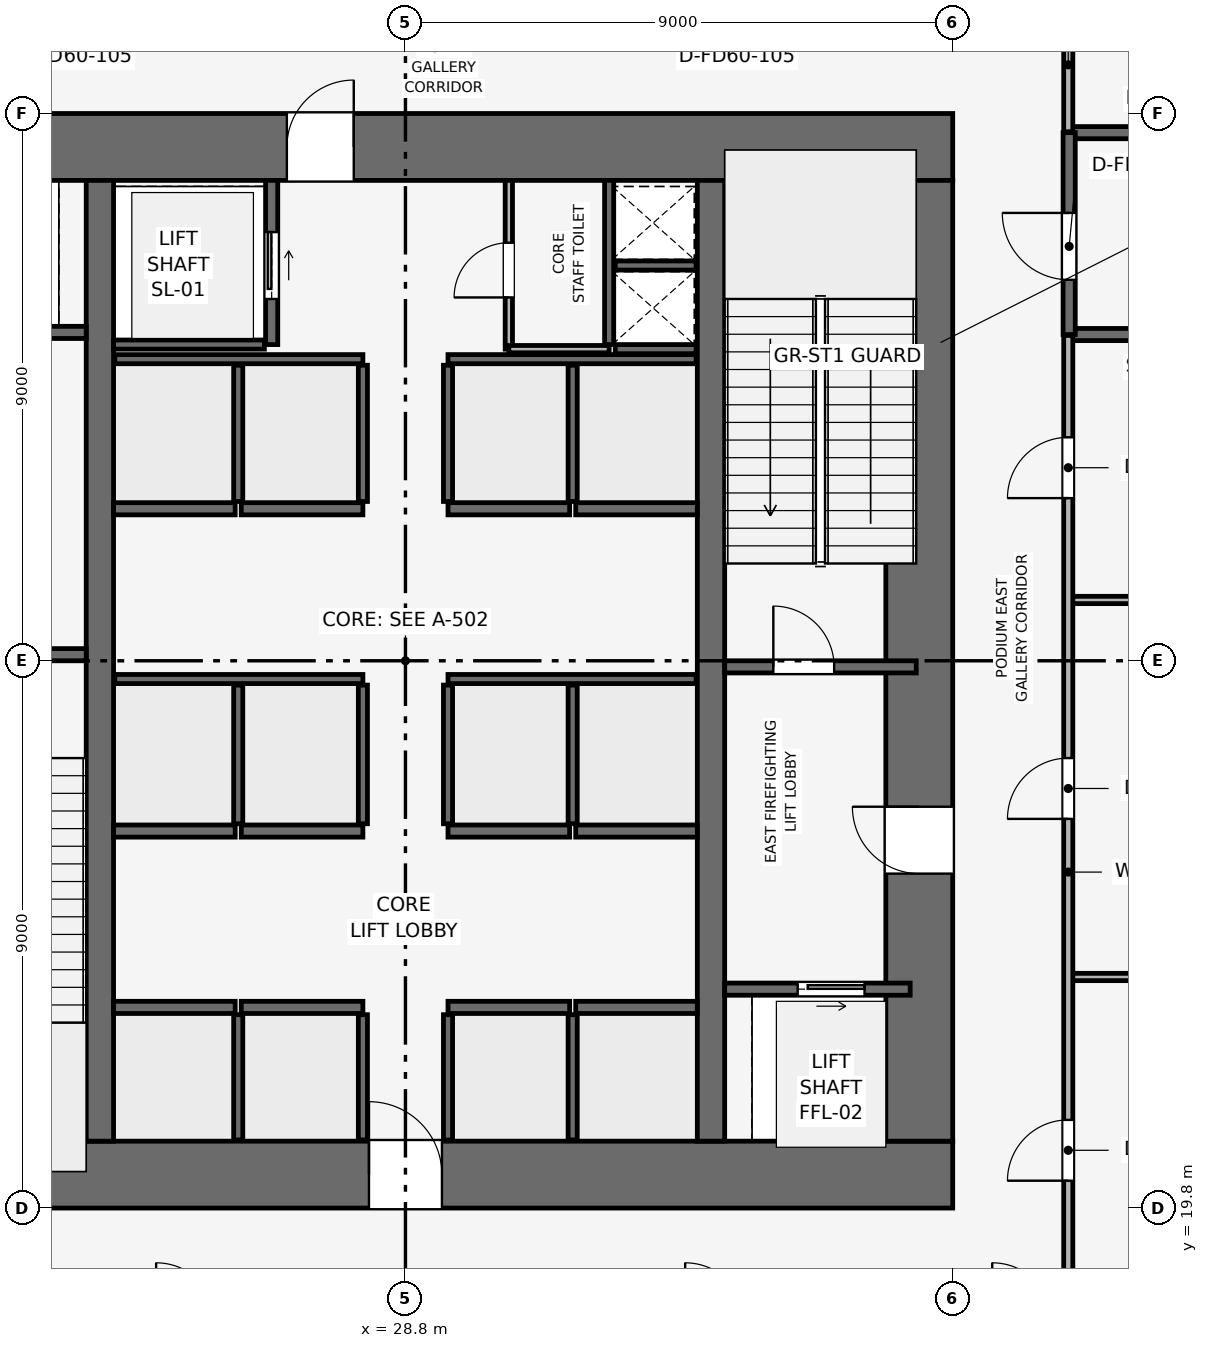
"""IFC4 building model, lengths in metres.
Left out: names, types, materials, properties, quantities, classifications, styles, units other than length and angle.
Written with IfcOpenShell. Run it as: python <this file> out.ifc"""

import sys

from ifc_helpers import new_model, si_unit, direction, frame, frame_2d, origin, place, context, subcontext, project, spatial, rectangle, extrude, element, fill, save


model = new_model("IFC4")
c1 = context("Model", 3, precision=1e-05, world=origin(), true_north=direction((0.0, 1.0)))
c2 = subcontext(c1, "Body", "Model", "MODEL_VIEW")
j1 = project(units=[si_unit("LENGTHUNIT", "METRE"), si_unit("PLANEANGLEUNIT", "RADIAN")], contexts=[c1])
p1 = place(None, origin())
s1 = spatial("IfcSite", under=j1, at=p1, CompositionType="ELEMENT")
p2 = place(p1, origin())
s2 = spatial("IfcBuilding", under=s1, at=p2, CompositionType="ELEMENT")
p3 = place(p2, frame((0.0, 0.0, 13.8)))
s3 = spatial("IfcBuildingStorey", under=s2, at=p3, CompositionType="ELEMENT", Elevation=13.8)
p4 = place(p3, frame((19.8, 20.35, 0.0), z_axis=(0.0, 0.0, 1.0), x_axis=(1.0, 0.0, 0.0)))
e1 = element("IfcWall", 1, at=p4, inside=s3, PredefinedType="SHEAR", context=c2, shape_type="SweptSolid", body=[
    extrude(rectangle(XDim=18.0, YDim=1.1, at=frame_2d((9.0, 0.0))), origin(), (0.0, 0.0, 1.0), 5.4),
])
p5 = place(p4, frame((8.4, 0.0, 0.0)))
e2 = element("IfcOpeningElement", 2, at=p5, cuts=e1, PredefinedType="OPENING", context=c2, shape_type="SweptSolid", body=[
    extrude(rectangle(XDim=1.2, YDim=2.2, at=frame_2d((0.6, 1.1))), frame((0.0, 0.56, 0.0), z_axis=(0.0, -1.0, 0.0), x_axis=(1.0, 0.0, 0.0)), (0.0, 0.0, 1.0), 1.12),
])
p6 = place(p3, frame((19.8, 37.25, 0.0), z_axis=(0.0, 0.0, 1.0), x_axis=(1.0, 0.0, 0.0)))
e3 = element("IfcWall", 3, at=p6, inside=s3, PredefinedType="SHEAR", context=c2, shape_type="SweptSolid", body=[
    extrude(rectangle(XDim=18.0, YDim=1.1, at=frame_2d((9.0, 0.0))), origin(), (0.0, 0.0, 1.0), 5.4),
])
p7 = place(p6, frame((7.05, 0.0, 0.0)))
e4 = element("IfcOpeningElement", 4, at=p7, cuts=e3, PredefinedType="OPENING", context=c2, shape_type="SweptSolid", body=[
    extrude(rectangle(XDim=1.1, YDim=2.15, at=frame_2d((0.55, 1.075))), frame((0.0, 0.56, 0.0), z_axis=(0.0, -1.0, 0.0), x_axis=(1.0, 0.0, 0.0)), (0.0, 0.0, 1.0), 1.12),
])
p8 = place(p3, frame((37.25, 20.9, 0.0), z_axis=(0.0, 0.0, 1.0), x_axis=(0.0, 1.0, 0.0)))
e5 = element("IfcWall", 5, at=p8, inside=s3, PredefinedType="SHEAR", context=c2, shape_type="SweptSolid", body=[
    extrude(rectangle(XDim=15.8, YDim=1.1, at=frame_2d((7.9, 0.0))), origin(), (0.0, 0.0, 1.0), 5.4),
])
p9 = place(p8, frame((4.4, 0.0, 0.0)))
e6 = element("IfcOpeningElement", 6, at=p9, cuts=e5, PredefinedType="OPENING", context=c2, shape_type="SweptSolid", body=[
    extrude(rectangle(XDim=1.1, YDim=2.15, at=frame_2d((0.55, 1.075))), frame((0.0, 0.56, 0.0), z_axis=(0.0, -1.0, 0.0), x_axis=(1.0, 0.0, 0.0)), (0.0, 0.0, 1.0), 1.12),
])
for number, where, z_axis, x_axis in (
    (7, (23.775, 20.9, 0.0), (0.0, 0.0, 1.0), (0.0, 1.0, 0.0)),
    (8, (33.825, 20.9, 0.0), (0.0, 0.0, 1.0), (0.0, 1.0, 0.0)),
):
    element("IfcWall", number, at=place(p3, frame(where, z_axis=z_axis, x_axis=x_axis)), inside=s3, PredefinedType="SHEAR", context=c2, shape_type="SweptSolid", body=[
        extrude(rectangle(XDim=15.8, YDim=0.45, at=frame_2d((7.9, 0.0))), origin(), (0.0, 0.0, 1.0), 5.4),
    ])
p10 = place(p3, frame((20.4, 28.9, 0.0), z_axis=(0.0, 0.0, 1.0), x_axis=(1.0, 0.0, 0.0)))
e9 = element("IfcWall", 9, at=p10, inside=s3, PredefinedType="SHEAR", context=c2, shape_type="SweptSolid", body=[
    extrude(rectangle(XDim=3.15, YDim=0.2, at=frame_2d((1.575, 0.0))), origin(), (0.0, 0.0, 1.0), 5.05),
])
p11 = place(p10, frame((0.8, 0.0, 0.0)))
e10 = element("IfcOpeningElement", 10, at=p11, cuts=e9, PredefinedType="OPENING", context=c2, shape_type="SweptSolid", body=[
    extrude(rectangle(XDim=1.0, YDim=2.1, at=frame_2d((0.5, 1.05))), frame((0.0, 0.11, 0.0), z_axis=(0.0, -1.0, 0.0), x_axis=(1.0, 0.0, 0.0)), (0.0, 0.0, 1.0), 0.22),
])
p12 = place(p3, frame((34.05, 28.7, 0.0), z_axis=(0.0, 0.0, 1.0), x_axis=(1.0, 0.0, 0.0)))
e11 = element("IfcWall", 11, at=p12, inside=s3, PredefinedType="SHEAR", context=c2, shape_type="SweptSolid", body=[
    extrude(rectangle(XDim=3.15, YDim=0.2, at=frame_2d((1.575, 0.0))), origin(), (0.0, 0.0, 1.0), 5.05),
])
p13 = place(p12, frame((0.8, 0.0, 0.0)))
e12 = element("IfcOpeningElement", 12, at=p13, cuts=e11, PredefinedType="OPENING", context=c2, shape_type="SweptSolid", body=[
    extrude(rectangle(XDim=1.0, YDim=2.1, at=frame_2d((0.5, 1.05))), frame((0.0, 0.11, 0.0), z_axis=(0.0, -1.0, 0.0), x_axis=(1.0, 0.0, 0.0)), (0.0, 0.0, 1.0), 0.22),
])
p14 = place(p3, frame((32.15, 34.0, 0.0), z_axis=(0.0, 0.0, 1.0), x_axis=(0.0, 1.0, 0.0)))
e13 = element("IfcWall", 13, at=p14, inside=s3, PredefinedType="SHEAR", context=c2, shape_type="SweptSolid", body=[
    extrude(rectangle(XDim=2.7, YDim=0.15, at=frame_2d((1.35, 0.0))), origin(), (0.0, 0.0, 1.0), 5.05),
])
for number, where, z_axis, x_axis in (
    (14, (32.25, 33.925, 0.0), (0.0, 0.0, 1.0), (1.0, 0.0, 0.0)),
    (15, (32.25, 35.3, 0.0), (0.0, 0.0, 1.0), (1.0, 0.0, 0.0)),
):
    element("IfcWall", number, at=place(p3, frame(where, z_axis=z_axis, x_axis=x_axis)), inside=s3, PredefinedType="SHEAR", context=c2, shape_type="SweptSolid", body=[
        extrude(rectangle(XDim=1.33, YDim=0.15, at=frame_2d((0.665, 0.0))), origin(), (0.0, 0.0, 1.0), 5.05),
    ])
p15 = place(p3, frame((20.5, 34.2, 0.0), z_axis=(0.0, 0.0, 1.0), x_axis=(1.0, 0.0, 0.0)))
e16 = element("IfcWall", 16, at=p15, inside=s3, PredefinedType="SHEAR", context=c2, shape_type="SweptSolid", body=[
    extrude(rectangle(XDim=3.05, YDim=0.2, at=frame_2d((1.525, 0.0))), origin(), (0.0, 0.0, 1.0), 5.05),
])
p16 = place(p15, frame((0.75, 0.0, 0.0)))
e17 = element("IfcOpeningElement", 17, at=p16, cuts=e16, PredefinedType="OPENING", context=c2, shape_type="SweptSolid", body=[
    extrude(rectangle(XDim=1.1, YDim=2.15, at=frame_2d((0.55, 1.075))), frame((0.0, 0.11, 0.0), z_axis=(0.0, -1.0, 0.0), x_axis=(1.0, 0.0, 0.0)), (0.0, 0.0, 1.0), 0.22),
])
p17 = place(p3, frame((34.05, 23.4, 0.0), z_axis=(0.0, 0.0, 1.0), x_axis=(1.0, 0.0, 0.0)))
e18 = element("IfcWall", 18, at=p17, inside=s3, PredefinedType="SHEAR", context=c2, shape_type="SweptSolid", body=[
    extrude(rectangle(XDim=3.05, YDim=0.2, at=frame_2d((1.525, 0.0))), origin(), (0.0, 0.0, 1.0), 5.05),
])
p18 = place(p17, frame((1.2, 0.0, 0.0)))
e19 = element("IfcOpeningElement", 19, at=p18, cuts=e18, PredefinedType="OPENING", context=c2, shape_type="SweptSolid", body=[
    extrude(rectangle(XDim=1.1, YDim=2.15, at=frame_2d((0.55, 1.075))), frame((0.0, 0.11, 0.0), z_axis=(0.0, -1.0, 0.0), x_axis=(1.0, 0.0, 0.0)), (0.0, 0.0, 1.0), 0.22),
])
p19 = place(p3, frame((26.6, 34.0, 0.0), z_axis=(0.0, 0.0, 1.0), x_axis=(0.0, 1.0, 0.0)))
e20 = element("IfcWall", 20, at=p19, inside=s3, PredefinedType="SHEAR", context=c2, shape_type="SweptSolid", body=[
    extrude(rectangle(XDim=2.7, YDim=0.2, at=frame_2d((1.35, 0.0))), origin(), (0.0, 0.0, 1.0), 5.05),
])
p20 = place(p19, frame((0.75, 0.0, 0.0)))
e21 = element("IfcOpeningElement", 21, at=p20, cuts=e20, PredefinedType="OPENING", context=c2, shape_type="SweptSolid", body=[
    extrude(rectangle(XDim=1.1, YDim=2.15, at=frame_2d((0.55, 1.075))), frame((0.0, 0.11, 0.0), z_axis=(0.0, -1.0, 0.0), x_axis=(1.0, 0.0, 0.0)), (0.0, 0.0, 1.0), 0.22),
])
p21 = place(p3, frame((24.0, 34.0, 0.0), z_axis=(0.0, 0.0, 1.0), x_axis=(1.0, 0.0, 0.0)))
e22 = element("IfcWall", 22, at=p21, inside=s3, PredefinedType="SHEAR", context=c2, shape_type="SweptSolid", body=[
    extrude(rectangle(XDim=2.48, YDim=0.15, at=frame_2d((1.24, 0.0))), origin(), (0.0, 0.0, 1.0), 5.05),
])
for number, where, z_axis, x_axis in (
    (23, (24.0, 23.1, 0.0), (0.0, 0.0, 1.0), (1.0, 0.0, 0.0)),
    (24, (26.1, 23.1, 0.0), (0.0, 0.0, 1.0), (1.0, 0.0, 0.0)),
    (25, (29.5, 23.1, 0.0), (0.0, 0.0, 1.0), (1.0, 0.0, 0.0)),
    (26, (31.6, 23.1, 0.0), (0.0, 0.0, 1.0), (1.0, 0.0, 0.0)),
    (27, (24.0, 26.0, 0.0), (0.0, 0.0, 1.0), (1.0, 0.0, 0.0)),
    (28, (26.1, 26.0, 0.0), (0.0, 0.0, 1.0), (1.0, 0.0, 0.0)),
    (29, (29.5, 26.0, 0.0), (0.0, 0.0, 1.0), (1.0, 0.0, 0.0)),
    (30, (31.6, 26.0, 0.0), (0.0, 0.0, 1.0), (1.0, 0.0, 0.0)),
    (31, (24.0, 31.3, 0.0), (0.0, 0.0, 1.0), (1.0, 0.0, 0.0)),
    (32, (26.1, 31.3, 0.0), (0.0, 0.0, 1.0), (1.0, 0.0, 0.0)),
    (33, (29.5, 31.3, 0.0), (0.0, 0.0, 1.0), (1.0, 0.0, 0.0)),
    (34, (31.6, 31.3, 0.0), (0.0, 0.0, 1.0), (1.0, 0.0, 0.0)),
):
    element("IfcWall", number, at=place(p3, frame(where, z_axis=z_axis, x_axis=x_axis)), inside=s3, PredefinedType="SHEAR", context=c2, shape_type="SweptSolid", body=[
        extrude(rectangle(XDim=2.0, YDim=0.2, at=frame_2d((1.0, 0.0))), origin(), (0.0, 0.0, 1.0), 5.05),
    ])
for number, where, z_axis, x_axis in (
    (35, (26.05, 20.92, 0.0), (0.0, 0.0, 1.0), (0.0, 1.0, 0.0)),
    (36, (28.1, 20.92, 0.0), (0.0, 0.0, 1.0), (0.0, 1.0, 0.0)),
    (37, (29.5, 20.92, 0.0), (0.0, 0.0, 1.0), (0.0, 1.0, 0.0)),
    (38, (31.55, 20.92, 0.0), (0.0, 0.0, 1.0), (0.0, 1.0, 0.0)),
):
    element("IfcWall", number, at=place(p3, frame(where, z_axis=z_axis, x_axis=x_axis)), inside=s3, PredefinedType="SHEAR", context=c2, shape_type="SweptSolid", body=[
        extrude(rectangle(XDim=2.06, YDim=0.15, at=frame_2d((1.03, 0.0))), origin(), (0.0, 0.0, 1.0), 5.05),
    ])
for number, where, z_axis, x_axis in (
    (39, (24.02, 28.5, 0.0), (0.0, 0.0, 1.0), (1.0, 0.0, 0.0)),
    (40, (29.5, 28.5, 0.0), (0.0, 0.0, 1.0), (1.0, 0.0, 0.0)),
):
    element("IfcWall", number, at=place(p3, frame(where, z_axis=z_axis, x_axis=x_axis)), inside=s3, PredefinedType="SHEAR", context=c2, shape_type="SweptSolid", body=[
        extrude(rectangle(XDim=4.08, YDim=0.15, at=frame_2d((2.04, 0.0))), origin(), (0.0, 0.0, 1.0), 5.05),
    ])
for number, where, z_axis, x_axis in (
    (41, (26.05, 26.12, 0.0), (0.0, 0.0, 1.0), (0.0, 1.0, 0.0)),
    (42, (28.1, 26.12, 0.0), (0.0, 0.0, 1.0), (0.0, 1.0, 0.0)),
    (43, (29.5, 26.12, 0.0), (0.0, 0.0, 1.0), (0.0, 1.0, 0.0)),
    (44, (31.55, 26.12, 0.0), (0.0, 0.0, 1.0), (0.0, 1.0, 0.0)),
):
    element("IfcWall", number, at=place(p3, frame(where, z_axis=z_axis, x_axis=x_axis)), inside=s3, PredefinedType="SHEAR", context=c2, shape_type="SweptSolid", body=[
        extrude(rectangle(XDim=2.28, YDim=0.15, at=frame_2d((1.14, 0.0))), origin(), (0.0, 0.0, 1.0), 5.05),
    ])
for number, where, z_axis, x_axis in (
    (45, (24.02, 33.76, 0.0), (0.0, 0.0, 1.0), (1.0, 0.0, 0.0)),
    (46, (29.5, 33.76, 0.0), (0.0, 0.0, 1.0), (1.0, 0.0, 0.0)),
):
    element("IfcWall", number, at=place(p3, frame(where, z_axis=z_axis, x_axis=x_axis)), inside=s3, PredefinedType="SHEAR", context=c2, shape_type="SweptSolid", body=[
        extrude(rectangle(XDim=4.08, YDim=0.15, at=frame_2d((2.04, 0.0))), origin(), (0.0, 0.0, 1.0), 5.05),
    ])
for number, where, z_axis, x_axis in (
    (47, (26.05, 31.42, 0.0), (0.0, 0.0, 1.0), (0.0, 1.0, 0.0)),
    (48, (28.1, 31.42, 0.0), (0.0, 0.0, 1.0), (0.0, 1.0, 0.0)),
    (49, (29.5, 31.42, 0.0), (0.0, 0.0, 1.0), (0.0, 1.0, 0.0)),
    (50, (31.55, 31.42, 0.0), (0.0, 0.0, 1.0), (0.0, 1.0, 0.0)),
):
    element("IfcWall", number, at=place(p3, frame(where, z_axis=z_axis, x_axis=x_axis)), inside=s3, PredefinedType="SHEAR", context=c2, shape_type="SweptSolid", body=[
        extrude(rectangle(XDim=2.24, YDim=0.15, at=frame_2d((1.12, 0.0))), origin(), (0.0, 0.0, 1.0), 5.05),
    ])
for number, where, z_axis, x_axis in (
    (51, (39.715, 34.165, 0.0), (0.0, 0.0, 1.0), (1.0, 0.0, 0.0)),
    (52, (39.715, 37.485, 0.0), (0.0, 0.0, 1.0), (1.0, 0.0, 0.0)),
):
    element("IfcWall", number, at=place(p3, frame(where, z_axis=z_axis, x_axis=x_axis)), inside=s3, PredefinedType="SHEAR", context=c2, shape_type="SweptSolid", body=[
        extrude(rectangle(XDim=8.57, YDim=0.2, at=frame_2d((4.285, 0.0))), origin(), (0.0, 0.0, 1.0), 5.398),
    ])
p22 = place(p3, frame((39.715, 34.165, 0.0), z_axis=(0.0, 0.0, 1.0), x_axis=(0.0, 1.0, 0.0)))
e53 = element("IfcWall", 53, at=p22, inside=s3, PredefinedType="SHEAR", context=c2, shape_type="SweptSolid", body=[
    extrude(rectangle(XDim=3.32, YDim=0.2, at=frame_2d((1.66, 0.0))), origin(), (0.0, 0.0, 1.0), 5.398),
])
p23 = place(p22, frame((0.9, 0.0, 0.0)))
e54 = element("IfcOpeningElement", 54, at=p23, cuts=e53, PredefinedType="OPENING", context=c2, shape_type="SweptSolid", body=[
    extrude(rectangle(XDim=1.1, YDim=2.15, at=frame_2d((0.55, 1.075))), frame((0.0, 0.11, 0.0), z_axis=(0.0, -1.0, 0.0), x_axis=(1.0, 0.0, 0.0)), (0.0, 0.0, 1.0), 0.22),
])
p24 = place(p3, frame((30.5, 33.925, 0.0), z_axis=(0.0, 0.0, 1.0), x_axis=(0.0, 1.0, 0.0)))
e55 = element("IfcWall", 55, at=p24, inside=s3, PredefinedType="PARTITIONING", context=c2, shape_type="SweptSolid", body=[
    extrude(rectangle(XDim=2.775, YDim=0.12, at=frame_2d((1.387, 0.0))), origin(), (0.0, 0.0, 1.0), 5.05),
])
p25 = place(p24, frame((0.85, 0.0, 0.0)))
e56 = element("IfcOpeningElement", 56, at=p25, cuts=e55, PredefinedType="OPENING", context=c2, shape_type="SweptSolid", body=[
    extrude(rectangle(XDim=0.9, YDim=2.1, at=frame_2d((0.45, 1.05))), frame((0.0, 0.07, 0.0), z_axis=(0.0, -1.0, 0.0), x_axis=(1.0, 0.0, 0.0)), (0.0, 0.0, 1.0), 0.14),
])
p26 = place(p3, frame((30.5, 33.925, 0.0), z_axis=(0.0, 0.0, 1.0), x_axis=(1.0, 0.0, 0.0)))
e57 = element("IfcWall", 57, at=p26, inside=s3, PredefinedType="PARTITIONING", context=c2, shape_type="SweptSolid", body=[
    extrude(rectangle(XDim=1.65, YDim=0.12, at=frame_2d((0.825, 0.0))), origin(), (0.0, 0.0, 1.0), 5.05),
])
for number, where, z_axis, x_axis in (
    (58, (39.7, 23.6, 0.0), (0.0, 0.0, 1.0), (1.0, 0.0, 0.0)),
    (59, (39.7, 29.8, 0.0), (0.0, 0.0, 1.0), (1.0, 0.0, 0.0)),
):
    element("IfcWall", number, at=place(p3, frame(where, z_axis=z_axis, x_axis=x_axis)), inside=s3, PredefinedType="PARTITIONING", context=c2, shape_type="SweptSolid", body=[
        extrude(rectangle(XDim=17.05, YDim=0.12, at=frame_2d((8.525, 0.0))), origin(), (0.0, 0.0, 1.0), 4.035),
    ])
p27 = place(p3, frame((39.7, 17.9, 0.0), z_axis=(0.0, 0.0, 1.0), x_axis=(0.0, 1.0, 0.0)))
e60 = element("IfcWall", 60, at=p27, inside=s3, PredefinedType="PARTITIONING", context=c2, shape_type="SweptSolid", body=[
    extrude(rectangle(XDim=16.25, YDim=0.15, at=frame_2d((8.125, 0.0))), origin(), (0.0, 0.0, 1.0), 4.135),
])
p28 = place(p27, frame((2.35, 0.0, 0.0)))
e61 = element("IfcOpeningElement", 61, at=p28, cuts=e60, PredefinedType="OPENING", context=c2, shape_type="SweptSolid", body=[
    extrude(rectangle(XDim=1.0, YDim=2.15, at=frame_2d((0.5, 1.075))), frame((0.0, 0.085, 0.0), z_axis=(0.0, -1.0, 0.0), x_axis=(1.0, 0.0, 0.0)), (0.0, 0.0, 1.0), 0.17),
])
p29 = place(p27, frame((8.3, 0.0, 0.0)))
e62 = element("IfcOpeningElement", 62, at=p29, cuts=e60, PredefinedType="OPENING", context=c2, shape_type="SweptSolid", body=[
    extrude(rectangle(XDim=1.0, YDim=2.15, at=frame_2d((0.5, 1.075))), frame((0.0, 0.085, 0.0), z_axis=(0.0, -1.0, 0.0), x_axis=(1.0, 0.0, 0.0)), (0.0, 0.0, 1.0), 0.17),
])
p30 = place(p27, frame((13.575, 0.0, 0.0)))
e63 = element("IfcOpeningElement", 63, at=p30, cuts=e60, PredefinedType="OPENING", context=c2, shape_type="SweptSolid", body=[
    extrude(rectangle(XDim=1.0, YDim=2.15, at=frame_2d((0.5, 1.075))), frame((0.0, 0.085, 0.0), z_axis=(0.0, -1.0, 0.0), x_axis=(1.0, 0.0, 0.0)), (0.0, 0.0, 1.0), 0.17),
])
p31 = place(p3, frame((39.7, 37.5, 0.0), z_axis=(0.0, 0.0, 1.0), x_axis=(0.0, 1.0, 0.0)))
e64 = element("IfcWall", 64, at=p31, inside=s3, PredefinedType="PARTITIONING", context=c2, shape_type="SweptSolid", body=[
    extrude(rectangle(XDim=2.2, YDim=0.15, at=frame_2d((1.1, 0.0))), origin(), (0.0, 0.0, 1.0), 5.05),
])
p32 = place(p13, origin())
e65 = element("IfcDoor", 65, at=p32, inside=s3, OperationType="SINGLE_SWING_LEFT", PredefinedType="DOOR", context=c2, shape_type="SweptSolid", body=[
    extrude(rectangle(XDim=1.0, YDim=2.1, at=frame_2d((0.5, 1.05))), frame((0.0, 0.025, 0.0), z_axis=(0.0, -1.0, 0.0), x_axis=(1.0, 0.0, 0.0)), (0.0, 0.0, 1.0), 0.05),
])
fill(e12, e65)
p33 = place(p18, origin())
e66 = element("IfcDoor", 66, at=p33, inside=s3, OperationType="SLIDING_TO_RIGHT", PredefinedType="DOOR", context=c2, shape_type="SweptSolid", body=[
    extrude(rectangle(XDim=1.1, YDim=2.15, at=frame_2d((0.55, 1.075))), frame((0.0, 0.025, 0.0), z_axis=(0.0, -1.0, 0.0), x_axis=(1.0, 0.0, 0.0)), (0.0, 0.0, 1.0), 0.05),
])
fill(e19, e66)
p34 = place(p20, origin())
e67 = element("IfcDoor", 67, at=p34, inside=s3, OperationType="SLIDING_TO_RIGHT", PredefinedType="DOOR", context=c2, shape_type="SweptSolid", body=[
    extrude(rectangle(XDim=1.1, YDim=2.15, at=frame_2d((0.55, 1.075))), frame((0.0, 0.025, 0.0), z_axis=(0.0, -1.0, 0.0), x_axis=(1.0, 0.0, 0.0)), (0.0, 0.0, 1.0), 0.05),
])
fill(e21, e67)
p35 = place(p23, origin())
e68 = element("IfcDoor", 68, at=p35, inside=s3, OperationType="SINGLE_SWING_RIGHT", PredefinedType="DOOR", context=c2, shape_type="SweptSolid", body=[
    extrude(rectangle(XDim=1.1, YDim=2.15, at=frame_2d((0.55, 1.075))), frame((0.0, 0.025, 0.0), z_axis=(0.0, -1.0, 0.0), x_axis=(1.0, 0.0, 0.0)), (0.0, 0.0, 1.0), 0.05),
])
fill(e54, e68)
p36 = place(p25, origin())
e69 = element("IfcDoor", 69, at=p36, inside=s3, OperationType="SINGLE_SWING_LEFT", PredefinedType="DOOR", context=c2, shape_type="SweptSolid", body=[
    extrude(rectangle(XDim=0.9, YDim=2.1, at=frame_2d((0.45, 1.05))), frame((0.0, 0.025, 0.0), z_axis=(0.0, -1.0, 0.0), x_axis=(1.0, 0.0, 0.0)), (0.0, 0.0, 1.0), 0.05),
])
fill(e56, e69)
p37 = place(p28, origin())
e70 = element("IfcDoor", 70, at=p37, inside=s3, OperationType="SINGLE_SWING_LEFT", PredefinedType="DOOR", context=c2, shape_type="SweptSolid", body=[
    extrude(rectangle(XDim=1.0, YDim=2.15, at=frame_2d((0.5, 1.075))), frame((0.0, 0.025, 0.0), z_axis=(0.0, -1.0, 0.0), x_axis=(1.0, 0.0, 0.0)), (0.0, 0.0, 1.0), 0.05),
])
fill(e61, e70)
p38 = place(p29, origin())
e71 = element("IfcDoor", 71, at=p38, inside=s3, OperationType="SINGLE_SWING_LEFT", PredefinedType="DOOR", context=c2, shape_type="SweptSolid", body=[
    extrude(rectangle(XDim=1.0, YDim=2.15, at=frame_2d((0.5, 1.075))), frame((0.0, 0.025, 0.0), z_axis=(0.0, -1.0, 0.0), x_axis=(1.0, 0.0, 0.0)), (0.0, 0.0, 1.0), 0.05),
])
fill(e62, e71)
p39 = place(p30, origin())
e72 = element("IfcDoor", 72, at=p39, inside=s3, OperationType="SINGLE_SWING_LEFT", PredefinedType="DOOR", context=c2, shape_type="SweptSolid", body=[
    extrude(rectangle(XDim=1.0, YDim=2.15, at=frame_2d((0.5, 1.075))), frame((0.0, 0.025, 0.0), z_axis=(0.0, -1.0, 0.0), x_axis=(1.0, 0.0, 0.0)), (0.0, 0.0, 1.0), 0.05),
])
fill(e63, e72)
p40 = place(p9, origin())
e73 = element("IfcDoor", 73, at=p40, inside=s3, OperationType="SINGLE_SWING_RIGHT", PredefinedType="DOOR", context=c2, shape_type="SweptSolid", body=[
    extrude(rectangle(XDim=1.1, YDim=2.15, at=frame_2d((0.55, 1.075))), frame((0.0, 0.025, 0.0), z_axis=(0.0, -1.0, 0.0), x_axis=(1.0, 0.0, 0.0)), (0.0, 0.0, 1.0), 0.05),
])
fill(e6, e73)
p41 = place(p5, origin())
e74 = element("IfcDoor", 74, at=p41, inside=s3, OperationType="SINGLE_SWING_LEFT", PredefinedType="DOOR", context=c2, shape_type="SweptSolid", body=[
    extrude(rectangle(XDim=1.2, YDim=2.2, at=frame_2d((0.6, 1.1))), frame((0.0, 0.025, 0.0), z_axis=(0.0, -1.0, 0.0), x_axis=(1.0, 0.0, 0.0)), (0.0, 0.0, 1.0), 0.05),
])
fill(e2, e74)
p42 = place(p7, origin())
e75 = element("IfcDoor", 75, at=p42, inside=s3, OperationType="SINGLE_SWING_RIGHT", PredefinedType="DOOR", context=c2, shape_type="SweptSolid", body=[
    extrude(rectangle(XDim=1.1, YDim=2.15, at=frame_2d((0.55, 1.075))), frame((0.0, 0.025, 0.0), z_axis=(0.0, -1.0, 0.0), x_axis=(1.0, 0.0, 0.0)), (0.0, 0.0, 1.0), 0.05),
])
fill(e4, e75)
save(model, sys.argv[1])
